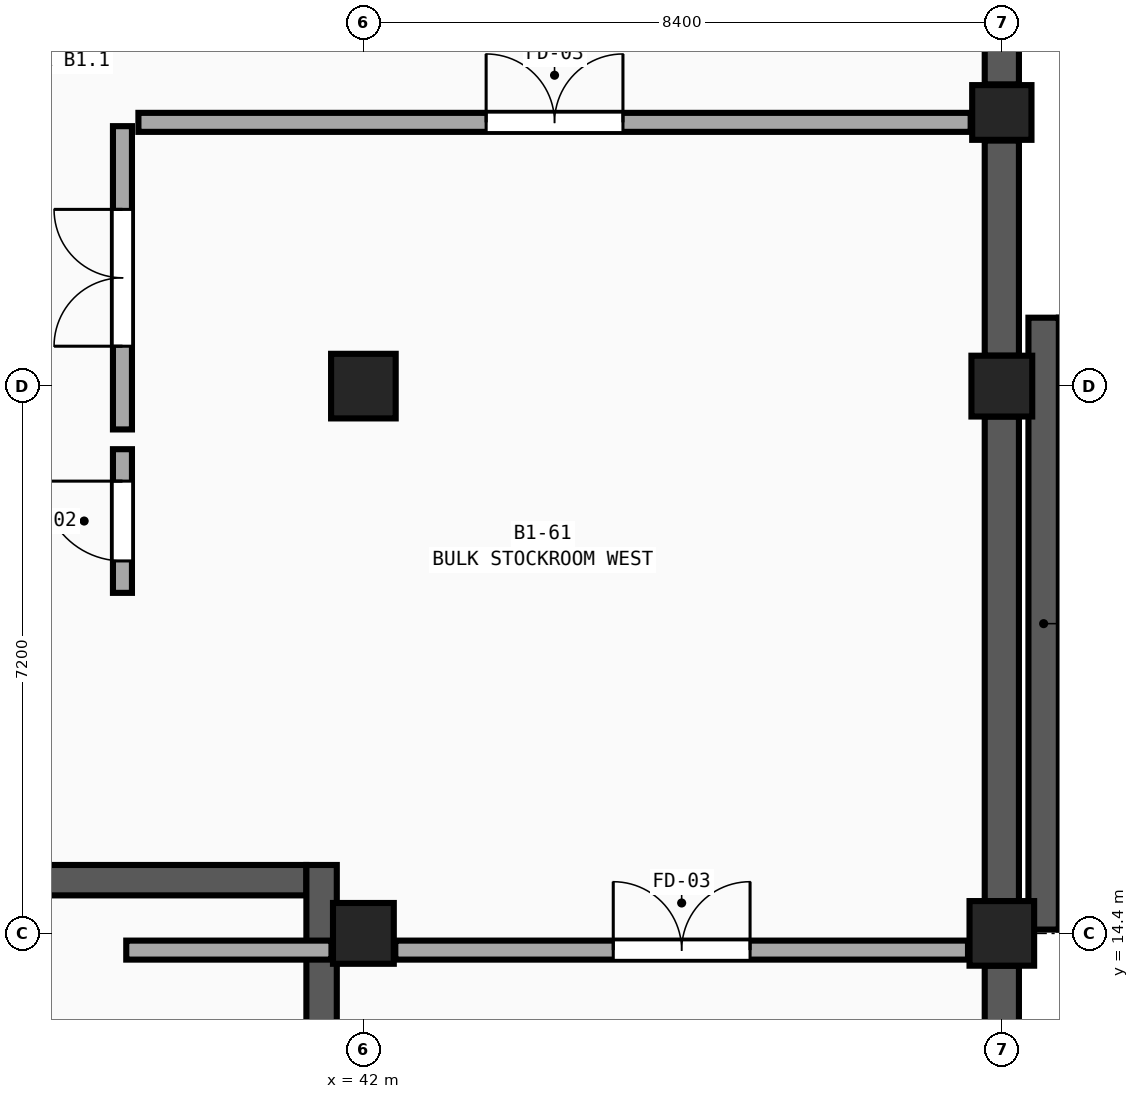
"""IFC4 building model, lengths in metres.
Left out: names, types, materials, properties, quantities, classifications, styles, units other than length and angle.
Written with IfcOpenShell. Run it as: python <this file> out.ifc"""

import sys

from ifc_helpers import new_model, si_unit, direction, frame, frame_2d, origin, origin_2d, place, context, subcontext, project, spatial, rectangle, extrude, element, fill, save


model = new_model("IFC4")
c1 = context("Model", 3, precision=1e-05, world=origin(), true_north=direction((0.0, 1.0)))
c2 = subcontext(c1, "Body", "Model", "MODEL_VIEW")
j1 = project(units=[si_unit("LENGTHUNIT", "METRE"), si_unit("PLANEANGLEUNIT", "RADIAN")], contexts=[c1])
p1 = place(None, origin())
s1 = spatial("IfcSite", under=j1, at=p1, CompositionType="ELEMENT")
p2 = place(p1, origin())
s2 = spatial("IfcBuilding", under=s1, at=p2, CompositionType="ELEMENT")
p3 = place(p2, frame((0.0, 0.0, -5.4)))
s3 = spatial("IfcBuildingStorey", under=s2, at=p3, CompositionType="ELEMENT", Elevation=-5.4)
p4 = place(p3, frame((42.0, 14.4, 0.0), z_axis=(0.0, 0.0, 1.0), x_axis=(1.0, 0.0, 0.0)))
e1 = element("IfcColumn", 1, at=p4, inside=s3, PredefinedType="COLUMN", context=c2, shape_type="SweptSolid", body=[
    extrude(rectangle(XDim=0.8, YDim=0.8, at=origin_2d()), origin(), (0.0, 0.0, 1.0), 5.4),
])
for number, where, z_axis, x_axis in (
    (2, (42.0, 21.6, 0.0), (0.0, 0.0, 1.0), (1.0, 0.0, 0.0)),
    (3, (50.4, 14.4, 0.0), (0.0, 0.0, 1.0), (1.0, 0.0, 0.0)),
):
    element("IfcColumn", number, at=place(p3, frame(where, z_axis=z_axis, x_axis=x_axis)), inside=s3, PredefinedType="COLUMN", context=c2, shape_type="SweptSolid", body=[
        extrude(rectangle(XDim=0.85, YDim=0.85, at=origin_2d()), origin(), (0.0, 0.0, 1.0), 5.4),
    ])
p5 = place(p3, frame((50.4, 21.6, 0.0), z_axis=(0.0, 0.0, 1.0), x_axis=(1.0, 0.0, 0.0)))
e4 = element("IfcColumn", 4, at=p5, inside=s3, PredefinedType="COLUMN", context=c2, shape_type="SweptSolid", body=[
    extrude(rectangle(XDim=0.8, YDim=0.8, at=origin_2d()), origin(), (0.0, 0.0, 1.0), 5.4),
])
p6 = place(p3, frame((50.4, 25.2, 0.0), z_axis=(0.0, 0.0, 1.0), x_axis=(1.0, 0.0, 0.0)))
e5 = element("IfcColumn", 5, at=p6, inside=s3, PredefinedType="PILASTER", context=c2, shape_type="SweptSolid", body=[
    extrude(rectangle(XDim=0.78, YDim=0.72, at=origin_2d()), origin(), (0.0, 0.0, 1.0), 5.4),
])
p7 = place(p3, frame((50.4, 13.975, 0.0), z_axis=(0.0, 0.0, 1.0), x_axis=(0.0, -1.0, 0.0)))
e6 = element("IfcWall", 6, at=p7, inside=s3, PredefinedType="USERDEFINED", context=c2, shape_type="SweptSolid", body=[
    extrude(rectangle(XDim=2.805, YDim=0.45, at=frame_2d((1.403, 0.0))), origin(), (0.0, 0.0, 1.0), 4.5),
])
p8 = place(p3, frame((50.4, 21.2, 0.0), z_axis=(0.0, 0.0, 1.0), x_axis=(0.0, -1.0, 0.0)))
e7 = element("IfcWall", 7, at=p8, inside=s3, PredefinedType="USERDEFINED", context=c2, shape_type="SweptSolid", body=[
    extrude(rectangle(XDim=6.375, YDim=0.45, at=frame_2d((3.188, 0.0))), origin(), (0.0, 0.0, 1.0), 4.5),
])
p9 = place(p3, frame((50.4, 28.375, 0.0), z_axis=(0.0, 0.0, 1.0), x_axis=(0.0, -1.0, 0.0)))
e8 = element("IfcWall", 8, at=p9, inside=s3, PredefinedType="USERDEFINED", context=c2, shape_type="SweptSolid", body=[
    extrude(rectangle(XDim=2.805, YDim=0.45, at=frame_2d((1.402, 0.0))), origin(), (0.0, 0.0, 1.0), 4.5),
])
p10 = place(p3, frame((50.4, 24.83, 0.0), z_axis=(0.0, 0.0, 1.0), x_axis=(0.0, -1.0, 0.0)))
e9 = element("IfcWall", 9, at=p10, inside=s3, PredefinedType="USERDEFINED", context=c2, shape_type="SweptSolid", body=[
    extrude(rectangle(XDim=2.83, YDim=0.45, at=frame_2d((1.415, 0.0))), origin(), (0.0, 0.0, 1.0), 4.5),
])
for number, where, z_axis, x_axis in (
    (10, (58.05, 14.65, 0.0), (0.0, 0.0, 1.0), (-1.0, 0.0, 0.0)),
    (11, (51.15, 22.3, 0.0), (0.0, 0.0, 1.0), (1.0, 0.0, 0.0)),
):
    element("IfcWall", number, at=place(p3, frame(where, z_axis=z_axis, x_axis=x_axis)), inside=s3, PredefinedType="SHEAR", context=c2, shape_type="SweptSolid", body=[
        extrude(rectangle(XDim=6.9, YDim=0.4, at=frame_2d((3.45, 0.0))), origin(), (0.0, 0.0, 1.0), 5.4),
    ])
p11 = place(p3, frame((50.95, 22.5, 0.0), z_axis=(0.0, 0.0, 1.0), x_axis=(0.0, -1.0, 0.0)))
e12 = element("IfcWall", 12, at=p11, inside=s3, PredefinedType="SHEAR", context=c2, shape_type="SweptSolid", body=[
    extrude(rectangle(XDim=8.05, YDim=0.4, at=frame_2d((4.025, 0.0))), origin(), (0.0, 0.0, 1.0), 5.4),
])
p12 = place(p3, frame((34.35, 15.1, 0.0), z_axis=(0.0, 0.0, 1.0), x_axis=(1.0, 0.0, 0.0)))
e13 = element("IfcWall", 13, at=p12, inside=s3, PredefinedType="SHEAR", context=c2, shape_type="SweptSolid", body=[
    extrude(rectangle(XDim=6.9, YDim=0.4, at=frame_2d((3.45, 0.0))), origin(), (0.0, 0.0, 1.0), 5.4),
])
p13 = place(p3, frame((41.45, 7.25, 0.0), z_axis=(0.0, 0.0, 1.0), x_axis=(0.0, 1.0, 0.0)))
e14 = element("IfcWall", 14, at=p13, inside=s3, PredefinedType="SHEAR", context=c2, shape_type="SweptSolid", body=[
    extrude(rectangle(XDim=8.05, YDim=0.4, at=frame_2d((4.025, 0.0))), origin(), (0.0, 0.0, 1.0), 5.4),
])
p14 = place(p3, frame((38.88, 14.18, 0.0), z_axis=(0.0, 0.0, 1.0), x_axis=(1.0, 0.0, 0.0)))
e15 = element("IfcWall", 15, at=p14, inside=s3, PredefinedType="SOLIDWALL", context=c2, shape_type="SweptSolid", body=[
    extrude(rectangle(XDim=2.7, YDim=0.25, at=frame_2d((1.35, 0.0))), origin(), (0.0, 0.0, 1.0), 4.55),
])
p15 = place(p3, frame((42.42, 14.18, 0.0), z_axis=(0.0, 0.0, 1.0), x_axis=(1.0, 0.0, 0.0)))
e16 = element("IfcWall", 16, at=p15, inside=s3, PredefinedType="SOLIDWALL", context=c2, shape_type="SweptSolid", body=[
    extrude(rectangle(XDim=7.535, YDim=0.25, at=frame_2d((3.768, 0.0))), origin(), (0.0, 0.0, 1.0), 4.55),
])
p16 = place(p15, frame((2.867, 0.0, 0.0)))
e17 = element("IfcOpeningElement", 17, at=p16, cuts=e16, PredefinedType="OPENING", context=c2, shape_type="SweptSolid", body=[
    extrude(rectangle(XDim=1.8, YDim=2.3, at=frame_2d((0.9, 1.15))), frame((0.0, 0.145, 0.0), z_axis=(0.0, -1.0, 0.0), x_axis=(1.0, 0.0, 0.0)), (0.0, 0.0, 1.0), 0.29),
])
p17 = place(p3, frame((39.04, 25.07, 0.0), z_axis=(0.0, 0.0, 1.0), x_axis=(1.0, 0.0, 0.0)))
e18 = element("IfcWall", 18, at=p17, inside=s3, PredefinedType="SOLIDWALL", context=c2, shape_type="SweptSolid", body=[
    extrude(rectangle(XDim=10.95, YDim=0.25, at=frame_2d((5.475, 0.0))), origin(), (0.0, 0.0, 1.0), 5.05),
])
p18 = place(p17, frame((4.575, 0.0, 0.0)))
e19 = element("IfcOpeningElement", 19, at=p18, cuts=e18, PredefinedType="OPENING", context=c2, shape_type="SweptSolid", body=[
    extrude(rectangle(XDim=1.8, YDim=2.3, at=frame_2d((0.9, 1.15))), frame((0.0, 0.145, 0.0), z_axis=(0.0, -1.0, 0.0), x_axis=(1.0, 0.0, 0.0)), (0.0, 0.0, 1.0), 0.29),
])
p19 = place(p3, frame((38.83, 21.03, 0.0), z_axis=(0.0, 0.0, 1.0), x_axis=(0.0, 1.0, 0.0)))
e20 = element("IfcWall", 20, at=p19, inside=s3, PredefinedType="SOLIDWALL", context=c2, shape_type="SweptSolid", body=[
    extrude(rectangle(XDim=3.99, YDim=0.25, at=frame_2d((1.995, 0.0))), origin(), (0.0, 0.0, 1.0), 5.05),
])
p20 = place(p19, frame((1.095, 0.0, 0.0)))
e21 = element("IfcOpeningElement", 21, at=p20, cuts=e20, PredefinedType="OPENING", context=c2, shape_type="SweptSolid", body=[
    extrude(rectangle(XDim=1.8, YDim=2.3, at=frame_2d((0.9, 1.15))), frame((0.0, 0.145, 0.0), z_axis=(0.0, -1.0, 0.0), x_axis=(1.0, 0.0, 0.0)), (0.0, 0.0, 1.0), 0.29),
])
p21 = place(p3, frame((38.83, 18.88, 0.0), z_axis=(0.0, 0.0, 1.0), x_axis=(0.0, 1.0, 0.0)))
e22 = element("IfcWall", 22, at=p21, inside=s3, PredefinedType="SOLIDWALL", context=c2, shape_type="SweptSolid", body=[
    extrude(rectangle(XDim=1.89, YDim=0.25, at=frame_2d((0.945, 0.0))), origin(), (0.0, 0.0, 1.0), 5.05),
])
p22 = place(p21, frame((0.42, 0.0, 0.0)))
e23 = element("IfcOpeningElement", 23, at=p22, cuts=e22, PredefinedType="OPENING", context=c2, shape_type="SweptSolid", body=[
    extrude(rectangle(XDim=1.05, YDim=2.15, at=frame_2d((0.525, 1.075))), frame((0.0, 0.145, 0.0), z_axis=(0.0, -1.0, 0.0), x_axis=(1.0, 0.0, 0.0)), (0.0, 0.0, 1.0), 0.29),
])
p23 = place(p16, origin())
e24 = element("IfcDoor", 24, at=p23, inside=s3, OperationType="DOUBLE_DOOR_SINGLE_SWING", PredefinedType="DOOR", context=c2, shape_type="SweptSolid", body=[
    extrude(rectangle(XDim=1.8, YDim=2.3, at=frame_2d((0.9, 1.15))), frame((0.0, 0.025, 0.0), z_axis=(0.0, -1.0, 0.0), x_axis=(1.0, 0.0, 0.0)), (0.0, 0.0, 1.0), 0.05),
])
fill(e17, e24)
p24 = place(p18, origin())
e25 = element("IfcDoor", 25, at=p24, inside=s3, OperationType="DOUBLE_DOOR_SINGLE_SWING", PredefinedType="DOOR", context=c2, shape_type="SweptSolid", body=[
    extrude(rectangle(XDim=1.8, YDim=2.3, at=frame_2d((0.9, 1.15))), frame((0.0, 0.025, 0.0), z_axis=(0.0, -1.0, 0.0), x_axis=(1.0, 0.0, 0.0)), (0.0, 0.0, 1.0), 0.05),
])
fill(e19, e25)
p25 = place(p20, origin())
e26 = element("IfcDoor", 26, at=p25, inside=s3, OperationType="DOUBLE_DOOR_SINGLE_SWING", PredefinedType="DOOR", context=c2, shape_type="SweptSolid", body=[
    extrude(rectangle(XDim=1.8, YDim=2.3, at=frame_2d((0.9, 1.15))), frame((0.0, 0.025, 0.0), z_axis=(0.0, -1.0, 0.0), x_axis=(1.0, 0.0, 0.0)), (0.0, 0.0, 1.0), 0.05),
])
fill(e21, e26)
p26 = place(p22, origin())
e27 = element("IfcDoor", 27, at=p26, inside=s3, OperationType="SINGLE_SWING_RIGHT", PredefinedType="DOOR", context=c2, shape_type="SweptSolid", body=[
    extrude(rectangle(XDim=1.05, YDim=2.15, at=frame_2d((0.525, 1.075))), frame((0.0, 0.025, 0.0), z_axis=(0.0, -1.0, 0.0), x_axis=(1.0, 0.0, 0.0)), (0.0, 0.0, 1.0), 0.05),
])
fill(e23, e27)
save(model, sys.argv[1])
